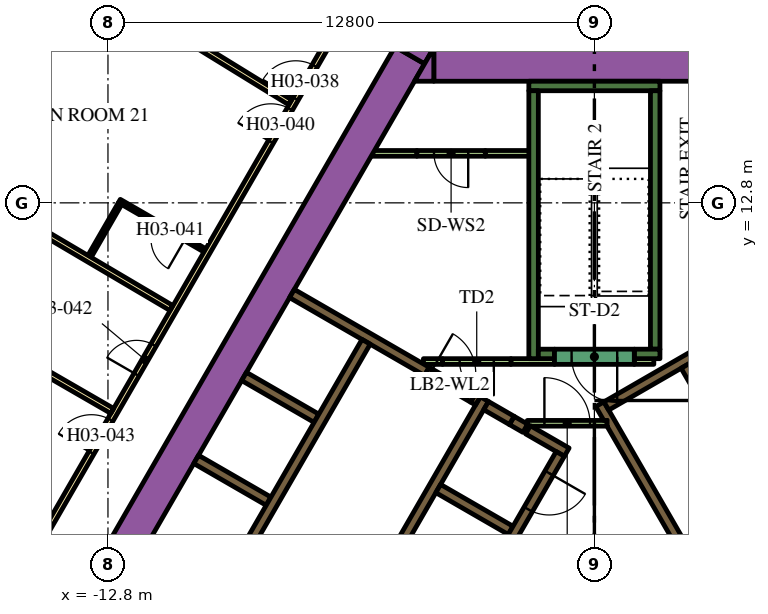
"""IFC4 building model, lengths in metres.
Left out: names, types, materials, properties, quantities, classifications, styles, units other than length and angle.
Written with IfcOpenShell. Run it as: python <this file> out.ifc"""

import sys

from ifc_helpers import new_model, si_unit, direction, frame, frame_2d, origin, place, context, subcontext, project, spatial, polyline, rectangle, outline, extrude, element, fill, save


model = new_model("IFC4")
c1 = context("Model", 3, precision=1e-05, world=origin(), true_north=direction((0.0, 1.0)))
c2 = subcontext(c1, "Body", "Model", "MODEL_VIEW")
j1 = project(units=[si_unit("LENGTHUNIT", "METRE"), si_unit("PLANEANGLEUNIT", "RADIAN")], contexts=[c1])
p1 = place(None, origin())
s1 = spatial("IfcSite", under=j1, at=p1, CompositionType="ELEMENT")
p2 = place(p1, origin())
s2 = spatial("IfcBuilding", under=s1, at=p2, CompositionType="ELEMENT")
p3 = place(p2, frame((0.0, 0.0, 54.9)))
s3 = spatial("IfcBuildingStorey", under=s2, at=p3, CompositionType="ELEMENT", Elevation=54.9)
p4 = place(p3, frame((-14.268, 0.387, 0.0), z_axis=(0.0, 0.0, 1.0), x_axis=(0.499994617707, 0.866028511231, 0.0)))
e1 = element("IfcWall", 1, at=p4, inside=s3, PredefinedType="SOLIDWALL", context=c2, shape_type="SweptSolid", body=[
    extrude(rectangle(XDim=18.817, YDim=0.9, at=frame_2d((9.409, 0.0))), origin(), (0.0, 0.0, 1.0), 3.9),
])
p5 = place(p3, origin())
e2 = element("IfcWall", 2, at=p5, inside=s3, PredefinedType="SOLIDWALL", context=c2, shape_type="SweptSolid", body=[
    extrude(outline(polyline([(-4.215, 16.9), (-4.469, 16.46), (-5.231, 16.9), (-4.215, 16.9)])), origin(), (0.0, 0.0, 1.0), 3.9),
])
p6 = place(p3, frame((-4.224, 16.45, 0.0), z_axis=(0.0, 0.0, 1.0), x_axis=(1.0, 0.0, 0.0)))
e3 = element("IfcWall", 3, at=p6, inside=s3, PredefinedType="SOLIDWALL", context=c2, shape_type="SweptSolid", body=[
    extrude(rectangle(XDim=9.488, YDim=0.9, at=frame_2d((4.744, 0.0))), origin(), (0.0, 0.0, 1.0), 3.9),
])
e4 = element("IfcWall", 4, at=p5, inside=s3, PredefinedType="SOLIDWALL", context=c2, shape_type="SweptSolid", body=[
    extrude(outline(polyline([(-4.734, 16.0), (-4.226, 16.88), (-4.226, 16.0), (-4.734, 16.0)])), origin(), (0.0, 0.0, 1.0), 3.9),
])
p7 = place(p3, frame((-1.725, 15.875, 0.0), z_axis=(0.0, 0.0, 1.0), x_axis=(1.0, 0.0, 0.0)))
e5 = element("IfcWall", 5, at=p7, inside=s3, PredefinedType="SOLIDWALL", context=c2, shape_type="SweptSolid", body=[
    extrude(rectangle(XDim=3.45, YDim=0.25, at=frame_2d((1.725, 0.0))), origin(), (0.0, 0.0, 1.0), 3.9),
])
p8 = place(p3, frame((1.6, 8.95, 0.0), z_axis=(0.0, 0.0, 1.0), x_axis=(0.0, 1.0, 0.0)))
e6 = element("IfcWall", 6, at=p8, inside=s3, PredefinedType="SOLIDWALL", context=c2, shape_type="SweptSolid", body=[
    extrude(rectangle(XDim=6.8, YDim=0.25, at=frame_2d((3.4, 0.0))), origin(), (0.0, 0.0, 1.0), 3.9),
])
p9 = place(p3, frame((1.05, 8.825, 0.0), z_axis=(0.0, 0.0, 1.0), x_axis=(1.0, 0.0, 0.0)))
e7 = element("IfcWall", 7, at=p9, inside=s3, PredefinedType="SOLIDWALL", context=c2, shape_type="SweptSolid", body=[
    extrude(rectangle(XDim=0.675, YDim=0.25, at=frame_2d((0.337, 0.0))), origin(), (0.0, 0.0, 1.0), 3.9),
])
p10 = place(p3, frame((-1.6, 8.7, 0.0), z_axis=(0.0, 0.0, 1.0), x_axis=(0.0, 1.0, 0.0)))
e8 = element("IfcWall", 8, at=p10, inside=s3, PredefinedType="SOLIDWALL", context=c2, shape_type="SweptSolid", body=[
    extrude(rectangle(XDim=7.05, YDim=0.25, at=frame_2d((3.525, 0.0))), origin(), (0.0, 0.0, 1.0), 3.9),
])
p11 = place(p3, frame((-1.475, 8.825, 0.0), z_axis=(0.0, 0.0, 1.0), x_axis=(1.0, 0.0, 0.0)))
e9 = element("IfcWall", 9, at=p11, inside=s3, PredefinedType="SOLIDWALL", context=c2, shape_type="SweptSolid", body=[
    extrude(rectangle(XDim=0.425, YDim=0.25, at=frame_2d((0.212, 0.0))), origin(), (0.0, 0.0, 1.0), 3.9),
])
e10 = element("IfcWall", 10, at=p5, inside=s3, PredefinedType="SOLIDWALL", context=c2, shape_type="SweptSolid", body=[
    extrude(outline(polyline([(0.335, 6.925), (0.335, 6.925), (0.335, 7.075), (0.335, 7.075), (0.335, 7.075), (0.245, 7.075), (0.079, 7.363), (0.035, 7.439), (0.252, 7.564), (0.377, 7.348), (6.552, -3.348), (6.677, -3.564), (6.46, -3.689), (4.897, -0.981), (0.332, 6.925), (0.335, 6.925), (0.335, 6.925)])), origin(), (0.0, 0.0, 1.0), 3.9),
])
p12 = place(p3, frame((0.314, 7.456, 0.0), z_axis=(0.0, 0.0, 1.0), x_axis=(0.866013897511, 0.50001992892, 0.0)))
e11 = element("IfcWall", 11, at=p12, inside=s3, PredefinedType="SOLIDWALL", context=c2, shape_type="SweptSolid", body=[
    extrude(rectangle(XDim=3.268, YDim=0.25, at=frame_2d((1.634, 0.0))), origin(), (0.0, 0.0, 1.0), 3.9),
])
p13 = place(p3, frame((-8.06, -1.311, 0.0), z_axis=(0.0, 0.0, 1.0), x_axis=(0.50000273126, 0.866023826885, 0.0)))
e12 = element("IfcWall", 12, at=p13, inside=s3, PredefinedType="SOLIDWALL", context=c2, shape_type="SweptSolid", body=[
    extrude(rectangle(XDim=10.33, YDim=0.25, at=frame_2d((5.165, 0.0))), origin(), (0.0, 0.0, 1.0), 3.9),
])
p14 = place(p3, frame((-1.819, 6.87, 0.0), z_axis=(0.0, 0.0, 1.0), x_axis=(-0.866294599386, 0.499533449405, 0.0)))
e13 = element("IfcWall", 13, at=p14, inside=s3, PredefinedType="SOLIDWALL", context=c2, shape_type="SweptSolid", body=[
    extrude(rectangle(XDim=0.41, YDim=0.25, at=frame_2d((0.205, 0.0))), origin(), (0.0, 0.0, 1.0), 3.9),
])
p15 = place(p3, frame((-2.849, 7.465, 0.0), z_axis=(0.0, 0.0, 1.0), x_axis=(0.865955664968, -0.500120771724, 0.0)))
e14 = element("IfcWall", 14, at=p15, inside=s3, PredefinedType="SOLIDWALL", context=c2, shape_type="SweptSolid", body=[
    extrude(rectangle(XDim=0.778, YDim=0.25, at=frame_2d((0.389, 0.0))), origin(), (0.0, 0.0, 1.0), 3.9),
])
p16 = place(p3, frame((-0.728, 6.24, 0.0), z_axis=(0.0, 0.0, 1.0), x_axis=(-0.866002680491, 0.500039355833, 0.0)))
e15 = element("IfcWall", 15, at=p16, inside=s3, PredefinedType="SOLIDWALL", context=c2, shape_type="SweptSolid", body=[
    extrude(rectangle(XDim=1.178, YDim=0.25, at=frame_2d((0.589, 0.0))), origin(), (0.0, 0.0, 1.0), 3.9),
])
p17 = place(p3, frame((-2.204, 4.182, 0.0), z_axis=(0.0, 0.0, 1.0), x_axis=(-0.866008176907, 0.50002983664, 0.0)))
e16 = element("IfcWall", 16, at=p17, inside=s3, PredefinedType="SOLIDWALL", context=c2, shape_type="SweptSolid", body=[
    extrude(rectangle(XDim=2.2, YDim=0.25, at=frame_2d((1.1, 0.0))), origin(), (0.0, 0.0, 1.0), 3.9),
])
e17 = element("IfcWall", 17, at=p5, inside=s3, PredefinedType="SOLIDWALL", context=c2, shape_type="SweptSolid", body=[
    extrude(outline(polyline([(-3.128, 7.481), (-3.259, 7.557), (-3.134, 7.773), (-3.003, 7.698), (-3.128, 7.481)])), origin(), (0.0, 0.0, 1.0), 3.9),
])
for number, where, z_axis, x_axis in (
    (18, (-8.574, 4.95, 0.0), (0.0, 0.0, 1.0), (-0.866, 0.5, 0.0)),
    (19, (-7.314, 7.132, 0.0), (0.0, 0.0, 1.0), (-0.866, 0.5, 0.0)),
):
    element("IfcWall", number, at=place(p3, frame(where, z_axis=z_axis, x_axis=x_axis)), inside=s3, PredefinedType="SOLIDWALL", context=c2, shape_type="SweptSolid", body=[
        extrude(rectangle(XDim=2.2, YDim=0.25, at=frame_2d((1.1, 0.0))), origin(), (0.0, 0.0, 1.0), 3.9),
    ])
p18 = place(p3, frame((-7.959, 10.415, 0.0), z_axis=(0.0, 0.0, 1.0), x_axis=(0.866020958405, -0.500007699544, 0.0)))
e20 = element("IfcWall", 20, at=p18, inside=s3, PredefinedType="SOLIDWALL", context=c2, shape_type="SweptSolid", body=[
    extrude(rectangle(XDim=4.1, YDim=0.25, at=frame_2d((2.05, 0.0))), origin(), (0.0, 0.0, 1.0), 3.9),
])
p19 = place(p3, frame((-3.997, 8.625, 0.0), z_axis=(0.0, 0.0, 1.0), x_axis=(-1.0, 0.0, 0.0)))
e21 = element("IfcWall", 21, at=p19, inside=s3, PredefinedType="PARTITIONING", context=c2, shape_type="SweptSolid", body=[
    extrude(rectangle(XDim=0.502, YDim=0.15, at=frame_2d((0.251, 0.0))), origin(), (0.0, 0.0, 1.0), 2.75),
])
p20 = place(p3, frame((-5.851, 14.102, 0.0), z_axis=(0.0, 0.0, 1.0), x_axis=(1.0, 0.0, 0.0)))
e22 = element("IfcWall", 22, at=p20, inside=s3, PredefinedType="PARTITIONING", context=c2, shape_type="SweptSolid", body=[
    extrude(rectangle(XDim=1.18, YDim=0.15, at=frame_2d((0.59, 0.0))), origin(), (0.0, 0.0, 1.0), 2.75),
])
p21 = place(p3, frame((-2.196, 8.625, 0.0), z_axis=(0.0, 0.0, 1.0), x_axis=(1.0, 0.0, 0.0)))
e23 = element("IfcWall", 23, at=p21, inside=s3, PredefinedType="PARTITIONING", context=c2, shape_type="SweptSolid", body=[
    extrude(rectangle(XDim=1.146, YDim=0.15, at=frame_2d((0.573, 0.0))), origin(), (0.0, 0.0, 1.0), 2.75),
])
p22 = place(p3, frame((1.05, 8.625, 0.0), z_axis=(0.0, 0.0, 1.0), x_axis=(1.0, 0.0, 0.0)))
e24 = element("IfcWall", 24, at=p22, inside=s3, PredefinedType="PARTITIONING", context=c2, shape_type="SweptSolid", body=[
    extrude(rectangle(XDim=0.514, YDim=0.15, at=frame_2d((0.257, 0.0))), origin(), (0.0, 0.0, 1.0), 2.75),
])
p23 = place(p3, frame((-2.871, 14.102, 0.0), z_axis=(0.0, 0.0, 1.0), x_axis=(1.0, 0.0, 0.0)))
e25 = element("IfcWall", 25, at=p23, inside=s3, PredefinedType="PARTITIONING", context=c2, shape_type="SweptSolid", body=[
    extrude(rectangle(XDim=1.196, YDim=0.15, at=frame_2d((0.598, 0.0))), origin(), (0.0, 0.0, 1.0), 2.75),
])
p24 = place(p3, frame((8.565, -2.185, 0.0), z_axis=(0.0, 0.0, 1.0), x_axis=(-0.499997954832, 0.866026584559, 0.0)))
e26 = element("IfcWall", 26, at=p24, inside=s3, PredefinedType="SOLIDWALL", context=c2, shape_type="SweptSolid", body=[
    extrude(rectangle(XDim=12.35, YDim=0.25, at=frame_2d((6.175, 0.0))), origin(), (0.0, 0.0, 1.0), 3.9),
])
p25 = place(p24, frame((5.725, 0.0, 0.0)))
e27 = element("IfcOpeningElement", 27, at=p25, cuts=e26, PredefinedType="OPENING", context=c2, shape_type="SweptSolid", body=[
    extrude(rectangle(XDim=0.9, YDim=2.1, at=frame_2d((0.45, 1.05))), frame((0.0, 0.135, 0.0), z_axis=(0.0, -1.0, 0.0), x_axis=(1.0, 0.0, 0.0)), (0.0, 0.0, 1.0), 0.27),
])
p26 = place(p3, frame((-6.008, 9.144, 0.0), z_axis=(0.0, 0.0, 1.0), x_axis=(-0.500006956611, -0.866021387346, 0.0)))
e28 = element("IfcWall", 28, at=p26, inside=s3, PredefinedType="SOLIDWALL", context=c2, shape_type="SweptSolid", body=[
    extrude(rectangle(XDim=9.83, YDim=0.25, at=frame_2d((4.915, 0.0))), origin(), (0.0, 0.0, 1.0), 3.9),
])
p27 = place(p26, frame((6.985, 0.0, 0.0)))
e29 = element("IfcOpeningElement", 29, at=p27, cuts=e28, PredefinedType="OPENING", context=c2, shape_type="SweptSolid", body=[
    extrude(rectangle(XDim=0.9, YDim=2.1, at=frame_2d((0.45, 1.05))), frame((0.0, 0.135, 0.0), z_axis=(0.0, -1.0, 0.0), x_axis=(1.0, 0.0, 0.0)), (0.0, 0.0, 1.0), 0.27),
])
p28 = place(p3, frame((-0.898, 6.194, 0.0), z_axis=(0.0, 0.0, 1.0), x_axis=(-0.499996202215, -0.866027596426, 0.0)))
e30 = element("IfcWall", 30, at=p28, inside=s3, PredefinedType="SOLIDWALL", context=c2, shape_type="SweptSolid", body=[
    extrude(rectangle(XDim=9.83, YDim=0.25, at=frame_2d((4.915, 0.0))), origin(), (0.0, 0.0, 1.0), 3.9),
])
p29 = place(p28, frame((0.585, 0.0, 0.0)))
e31 = element("IfcOpeningElement", 31, at=p29, cuts=e30, PredefinedType="OPENING", context=c2, shape_type="SweptSolid", body=[
    extrude(rectangle(XDim=1.1, YDim=2.1, at=frame_2d((0.55, 1.05))), frame((0.0, 0.135, 0.0), z_axis=(0.0, -1.0, 0.0), x_axis=(1.0, 0.0, 0.0)), (0.0, 0.0, 1.0), 0.27),
])
p30 = place(p28, frame((3.105, 0.0, 0.0)))
e32 = element("IfcOpeningElement", 32, at=p30, cuts=e30, PredefinedType="OPENING", context=c2, shape_type="SweptSolid", body=[
    extrude(rectangle(XDim=1.1, YDim=2.1, at=frame_2d((0.55, 1.05))), frame((0.0, 0.135, 0.0), z_axis=(0.0, -1.0, 0.0), x_axis=(1.0, 0.0, 0.0)), (0.0, 0.0, 1.0), 0.27),
])
p31 = place(p28, frame((5.625, 0.0, 0.0)))
e33 = element("IfcOpeningElement", 33, at=p31, cuts=e30, PredefinedType="OPENING", context=c2, shape_type="SweptSolid", body=[
    extrude(rectangle(XDim=1.1, YDim=2.1, at=frame_2d((0.55, 1.05))), frame((0.0, 0.135, 0.0), z_axis=(0.0, -1.0, 0.0), x_axis=(1.0, 0.0, 0.0)), (0.0, 0.0, 1.0), 0.27),
])
p32 = place(p28, frame((8.145, 0.0, 0.0)))
e34 = element("IfcOpeningElement", 34, at=p32, cuts=e30, PredefinedType="OPENING", context=c2, shape_type="SweptSolid", body=[
    extrude(rectangle(XDim=1.1, YDim=2.1, at=frame_2d((0.55, 1.05))), frame((0.0, 0.135, 0.0), z_axis=(0.0, -1.0, 0.0), x_axis=(1.0, 0.0, 0.0)), (0.0, 0.0, 1.0), 0.27),
])
p33 = place(p3, frame((1.05, 8.75, 0.0), z_axis=(0.0, 0.0, 1.0), x_axis=(-1.0, 0.0, 0.0)))
e35 = element("IfcWall", 35, at=p33, inside=s3, PredefinedType="SOLIDWALL", context=c2, shape_type="SweptSolid", body=[
    extrude(rectangle(XDim=2.1, YDim=0.4, at=frame_2d((1.05, 0.0))), origin(), (0.0, 0.0, 1.0), 3.9),
])
p34 = place(p33, frame((0.45, 0.0, 0.0)))
e36 = element("IfcOpeningElement", 36, at=p34, cuts=e35, PredefinedType="OPENING", context=c2, shape_type="SweptSolid", body=[
    extrude(rectangle(XDim=1.2, YDim=2.1, at=frame_2d((0.6, 1.05))), frame((0.0, 0.21, 0.0), z_axis=(0.0, -1.0, 0.0), x_axis=(1.0, 0.0, 0.0)), (0.0, 0.0, 1.0), 0.42),
])
p35 = place(p3, frame((-2.196, 8.625, 0.0), z_axis=(0.0, 0.0, 1.0), x_axis=(-1.0, 0.0, 0.0)))
e37 = element("IfcWall", 37, at=p35, inside=s3, PredefinedType="PARTITIONING", context=c2, shape_type="SweptSolid", body=[
    extrude(rectangle(XDim=1.8, YDim=0.15, at=frame_2d((0.9, 0.0))), origin(), (0.0, 0.0, 1.0), 2.75),
])
p36 = place(p35, frame((0.45, 0.0, 0.0)))
e38 = element("IfcOpeningElement", 38, at=p36, cuts=e37, PredefinedType="OPENING", context=c2, shape_type="SweptSolid", body=[
    extrude(rectangle(XDim=0.9, YDim=2.1, at=frame_2d((0.45, 1.05))), frame((0.0, 0.085, 0.0), z_axis=(0.0, -1.0, 0.0), x_axis=(1.0, 0.0, 0.0)), (0.0, 0.0, 1.0), 0.17),
])
p37 = place(p3, frame((-1.765, 7.0, 0.0), z_axis=(0.0, 0.0, 1.0), x_axis=(1.0, 0.0, 0.0)))
e39 = element("IfcWall", 39, at=p37, inside=s3, PredefinedType="PARTITIONING", context=c2, shape_type="SweptSolid", body=[
    extrude(rectangle(XDim=2.1, YDim=0.15, at=frame_2d((1.05, 0.0))), origin(), (0.0, 0.0, 1.0), 2.75),
])
p38 = place(p37, frame((0.45, 0.0, 0.0)))
e40 = element("IfcOpeningElement", 40, at=p38, cuts=e39, PredefinedType="OPENING", context=c2, shape_type="SweptSolid", body=[
    extrude(rectangle(XDim=1.2, YDim=2.1, at=frame_2d((0.6, 1.05))), frame((0.0, 0.085, 0.0), z_axis=(0.0, -1.0, 0.0), x_axis=(1.0, 0.0, 0.0)), (0.0, 0.0, 1.0), 0.17),
])
p39 = place(p3, frame((-4.409, 8.365, 0.0), z_axis=(0.0, 0.0, 1.0), x_axis=(0.866034573852, -0.49998411664, 0.0)))
e41 = element("IfcWall", 41, at=p39, inside=s3, PredefinedType="SOLIDWALL", context=c2, shape_type="SweptSolid", body=[
    extrude(rectangle(XDim=1.4, YDim=0.25, at=frame_2d((0.7, 0.0))), origin(), (0.0, 0.0, 1.0), 3.9),
])
p40 = place(p39, frame((0.1, 0.0, 0.0)))
e42 = element("IfcOpeningElement", 42, at=p40, cuts=e41, PredefinedType="OPENING", context=c2, shape_type="SweptSolid", body=[
    extrude(rectangle(XDim=1.2, YDim=2.1, at=frame_2d((0.6, 1.05))), frame((0.0, 0.135, 0.0), z_axis=(0.0, -1.0, 0.0), x_axis=(1.0, 0.0, 0.0)), (0.0, 0.0, 1.0), 0.27),
])
p41 = place(p3, frame((-2.871, 14.102, 0.0), z_axis=(0.0, 0.0, 1.0), x_axis=(-1.0, 0.0, 0.0)))
e43 = element("IfcWall", 43, at=p41, inside=s3, PredefinedType="PARTITIONING", context=c2, shape_type="SweptSolid", body=[
    extrude(rectangle(XDim=1.8, YDim=0.15, at=frame_2d((0.9, 0.0))), origin(), (0.0, 0.0, 1.0), 2.75),
])
p42 = place(p41, frame((0.45, 0.0, 0.0)))
e44 = element("IfcOpeningElement", 44, at=p42, cuts=e43, PredefinedType="OPENING", context=c2, shape_type="SweptSolid", body=[
    extrude(rectangle(XDim=0.9, YDim=2.1, at=frame_2d((0.45, 1.05))), frame((0.0, 0.085, 0.0), z_axis=(0.0, -1.0, 0.0), x_axis=(1.0, 0.0, 0.0)), (0.0, 0.0, 1.0), 0.17),
])
p43 = place(p3, frame((-19.081, -3.9, 0.0), z_axis=(0.0, 0.0, 1.0), x_axis=(0.499998313975, 0.866026377209, 0.0)))
e45 = element("IfcWall", 45, at=p43, inside=s3, PredefinedType="PARTITIONING", context=c2, shape_type="SweptSolid", body=[
    extrude(rectangle(XDim=25.766, YDim=0.15, at=frame_2d((12.883, 0.0))), origin(), (0.0, 0.0, 1.0), 2.75),
])
p44 = place(p43, frame((22.445, 0.0, 0.0)))
e46 = element("IfcOpeningElement", 46, at=p44, cuts=e45, PredefinedType="OPENING", context=c2, shape_type="SweptSolid", body=[
    extrude(rectangle(XDim=1.0, YDim=2.1, at=frame_2d((0.5, 1.05))), frame((0.0, 0.085, 0.0), z_axis=(0.0, -1.0, 0.0), x_axis=(1.0, 0.0, 0.0)), (0.0, 0.0, 1.0), 0.17),
])
p45 = place(p43, frame((21.138, 0.0, 0.0)))
e47 = element("IfcOpeningElement", 47, at=p45, cuts=e45, PredefinedType="OPENING", context=c2, shape_type="SweptSolid", body=[
    extrude(rectangle(XDim=1.0, YDim=2.1, at=frame_2d((0.5, 1.05))), frame((0.0, 0.085, 0.0), z_axis=(0.0, -1.0, 0.0), x_axis=(1.0, 0.0, 0.0)), (0.0, 0.0, 1.0), 0.17),
])
p46 = place(p43, frame((14.066, 0.0, 0.0)))
e48 = element("IfcOpeningElement", 48, at=p46, cuts=e45, PredefinedType="OPENING", context=c2, shape_type="SweptSolid", body=[
    extrude(rectangle(XDim=0.9, YDim=2.1, at=frame_2d((0.45, 1.05))), frame((0.0, 0.085, 0.0), z_axis=(0.0, -1.0, 0.0), x_axis=(1.0, 0.0, 0.0)), (0.0, 0.0, 1.0), 0.17),
])
p47 = place(p43, frame((11.693, 0.0, 0.0)))
e49 = element("IfcOpeningElement", 49, at=p47, cuts=e45, PredefinedType="OPENING", context=c2, shape_type="SweptSolid", body=[
    extrude(rectangle(XDim=1.0, YDim=2.1, at=frame_2d((0.5, 1.05))), frame((0.0, 0.085, 0.0), z_axis=(0.0, -1.0, 0.0), x_axis=(1.0, 0.0, 0.0)), (0.0, 0.0, 1.0), 0.17),
])
p48 = place(p3, frame((-19.982, 11.537, 0.0), z_axis=(0.0, 0.0, 1.0), x_axis=(0.866020994654, -0.500007636761, 0.0)))
e50 = element("IfcWall", 50, at=p48, inside=s3, PredefinedType="PARTITIONING", context=c2, shape_type="SweptSolid", body=[
    extrude(rectangle(XDim=8.423, YDim=0.15, at=frame_2d((4.211, 0.0))), origin(), (0.0, 0.0, 1.0), 2.75),
])
p49 = place(p3, frame((-17.856, 13.999, 0.0), z_axis=(0.0, 0.0, 1.0), x_axis=(0.861371519381, -0.507975497047, 0.0)))
e51 = element("IfcWall", 51, at=p49, inside=s3, PredefinedType="PARTITIONING", context=c2, shape_type="SweptSolid", body=[
    extrude(rectangle(XDim=7.804, YDim=0.15, at=frame_2d((3.902, 0.0))), origin(), (0.0, 0.0, 1.0), 2.75),
])
p50 = place(p3, frame((-14.558, 19.475, 0.0), z_axis=(0.0, 0.0, 1.0), x_axis=(0.851829455142, -0.523819223925, 0.0)))
e52 = element("IfcWall", 52, at=p50, inside=s3, PredefinedType="PARTITIONING", context=c2, shape_type="SweptSolid", body=[
    extrude(rectangle(XDim=7.688, YDim=0.15, at=frame_2d((3.844, 0.0))), origin(), (0.0, 0.0, 1.0), 2.75),
])
p51 = place(p3, frame((-10.249, 11.549, 0.0), z_axis=(0.0, 0.0, 1.0), x_axis=(-0.866021400173, 0.500006934395, 0.0)))
e53 = element("IfcWall", 53, at=p51, inside=s3, PredefinedType="PARTITIONING", context=c2, shape_type="SweptSolid", body=[
    extrude(rectangle(XDim=2.6, YDim=0.1, at=frame_2d((1.3, 0.0))), origin(), (0.0, 0.0, 1.0), 2.75),
])
p52 = place(p51, frame((0.6, 0.0, 0.0)))
e54 = element("IfcOpeningElement", 54, at=p52, cuts=e53, PredefinedType="OPENING", context=c2, shape_type="SweptSolid", body=[
    extrude(rectangle(XDim=0.9, YDim=2.1, at=frame_2d((0.45, 1.05))), frame((0.0, 0.06, 0.0), z_axis=(0.0, -1.0, 0.0), x_axis=(1.0, 0.0, 0.0)), (0.0, 0.0, 1.0), 0.12),
])
p53 = place(p3, frame((-12.487, 12.772, 0.0), z_axis=(0.0, 0.0, 1.0), x_axis=(-0.500085729368, -0.865975902253, 0.0)))
e55 = element("IfcWall", 55, at=p53, inside=s3, PredefinedType="PARTITIONING", context=c2, shape_type="SweptSolid", body=[
    extrude(rectangle(XDim=1.59, YDim=0.1, at=frame_2d((0.795, 0.0))), origin(), (0.0, 0.0, 1.0), 2.75),
])
p54 = place(p29, origin())
e56 = element("IfcDoor", 56, at=p54, inside=s3, OperationType="DOUBLE_DOOR_SLIDING", PredefinedType="DOOR", context=c2, shape_type="SweptSolid", body=[
    extrude(rectangle(XDim=1.1, YDim=2.1, at=frame_2d((0.55, 1.05))), frame((0.0, 0.025, 0.0), z_axis=(0.0, -1.0, 0.0), x_axis=(1.0, 0.0, 0.0)), (0.0, 0.0, 1.0), 0.05),
])
fill(e31, e56)
p55 = place(p34, origin())
e57 = element("IfcDoor", 57, at=p55, inside=s3, OperationType="SINGLE_SWING_LEFT", PredefinedType="DOOR", context=c2, shape_type="SweptSolid", body=[
    extrude(rectangle(XDim=1.2, YDim=2.1, at=frame_2d((0.6, 1.05))), frame((0.0, 0.025, 0.0), z_axis=(0.0, -1.0, 0.0), x_axis=(1.0, 0.0, 0.0)), (0.0, 0.0, 1.0), 0.05),
])
fill(e36, e57)
p56 = place(p36, origin())
e58 = element("IfcDoor", 58, at=p56, inside=s3, OperationType="SINGLE_SWING_LEFT", PredefinedType="DOOR", context=c2, shape_type="SweptSolid", body=[
    extrude(rectangle(XDim=0.9, YDim=2.1, at=frame_2d((0.45, 1.05))), frame((0.0, 0.025, 0.0), z_axis=(0.0, -1.0, 0.0), x_axis=(1.0, 0.0, 0.0)), (0.0, 0.0, 1.0), 0.05),
])
fill(e38, e58)
p57 = place(p38, origin())
e59 = element("IfcDoor", 59, at=p57, inside=s3, OperationType="SINGLE_SWING_LEFT", PredefinedType="DOOR", context=c2, shape_type="SweptSolid", body=[
    extrude(rectangle(XDim=1.2, YDim=2.1, at=frame_2d((0.6, 1.05))), frame((0.0, 0.025, 0.0), z_axis=(0.0, -1.0, 0.0), x_axis=(1.0, 0.0, 0.0)), (0.0, 0.0, 1.0), 0.05),
])
fill(e40, e59)
p58 = place(p40, origin())
e60 = element("IfcDoor", 60, at=p58, inside=s3, OperationType="SINGLE_SWING_LEFT", PredefinedType="DOOR", context=c2, shape_type="SweptSolid", body=[
    extrude(rectangle(XDim=1.2, YDim=2.1, at=frame_2d((0.6, 1.05))), frame((0.0, 0.025, 0.0), z_axis=(0.0, -1.0, 0.0), x_axis=(1.0, 0.0, 0.0)), (0.0, 0.0, 1.0), 0.05),
])
fill(e42, e60)
p59 = place(p42, origin())
e61 = element("IfcDoor", 61, at=p59, inside=s3, OperationType="SINGLE_SWING_LEFT", PredefinedType="DOOR", context=c2, shape_type="SweptSolid", body=[
    extrude(rectangle(XDim=0.9, YDim=2.1, at=frame_2d((0.45, 1.05))), frame((0.0, 0.025, 0.0), z_axis=(0.0, -1.0, 0.0), x_axis=(1.0, 0.0, 0.0)), (0.0, 0.0, 1.0), 0.05),
])
fill(e44, e61)
p60 = place(p44, origin())
e62 = element("IfcDoor", 62, at=p60, inside=s3, OperationType="SINGLE_SWING_LEFT", PredefinedType="DOOR", context=c2, shape_type="SweptSolid", body=[
    extrude(rectangle(XDim=1.0, YDim=2.1, at=frame_2d((0.5, 1.05))), frame((0.0, 0.025, 0.0), z_axis=(0.0, -1.0, 0.0), x_axis=(1.0, 0.0, 0.0)), (0.0, 0.0, 1.0), 0.05),
])
fill(e46, e62)
p61 = place(p45, origin())
e63 = element("IfcDoor", 63, at=p61, inside=s3, OperationType="SINGLE_SWING_RIGHT", PredefinedType="DOOR", context=c2, shape_type="SweptSolid", body=[
    extrude(rectangle(XDim=1.0, YDim=2.1, at=frame_2d((0.5, 1.05))), frame((0.0, 0.025, 0.0), z_axis=(0.0, -1.0, 0.0), x_axis=(1.0, 0.0, 0.0)), (0.0, 0.0, 1.0), 0.05),
])
fill(e47, e63)
p62 = place(p52, origin())
e64 = element("IfcDoor", 64, at=p62, inside=s3, OperationType="SINGLE_SWING_RIGHT", PredefinedType="DOOR", context=c2, shape_type="SweptSolid", body=[
    extrude(rectangle(XDim=0.9, YDim=2.1, at=frame_2d((0.45, 1.05))), frame((0.0, 0.025, 0.0), z_axis=(0.0, -1.0, 0.0), x_axis=(1.0, 0.0, 0.0)), (0.0, 0.0, 1.0), 0.05),
])
fill(e54, e64)
p63 = place(p46, origin())
e65 = element("IfcDoor", 65, at=p63, inside=s3, OperationType="SINGLE_SWING_RIGHT", PredefinedType="DOOR", context=c2, shape_type="SweptSolid", body=[
    extrude(rectangle(XDim=0.9, YDim=2.1, at=frame_2d((0.45, 1.05))), frame((0.0, 0.025, 0.0), z_axis=(0.0, -1.0, 0.0), x_axis=(1.0, 0.0, 0.0)), (0.0, 0.0, 1.0), 0.05),
])
fill(e48, e65)
p64 = place(p47, origin())
e66 = element("IfcDoor", 66, at=p64, inside=s3, OperationType="SINGLE_SWING_RIGHT", PredefinedType="DOOR", context=c2, shape_type="SweptSolid", body=[
    extrude(rectangle(XDim=1.0, YDim=2.1, at=frame_2d((0.5, 1.05))), frame((0.0, 0.025, 0.0), z_axis=(0.0, -1.0, 0.0), x_axis=(1.0, 0.0, 0.0)), (0.0, 0.0, 1.0), 0.05),
])
fill(e49, e66)
save(model, sys.argv[1])
